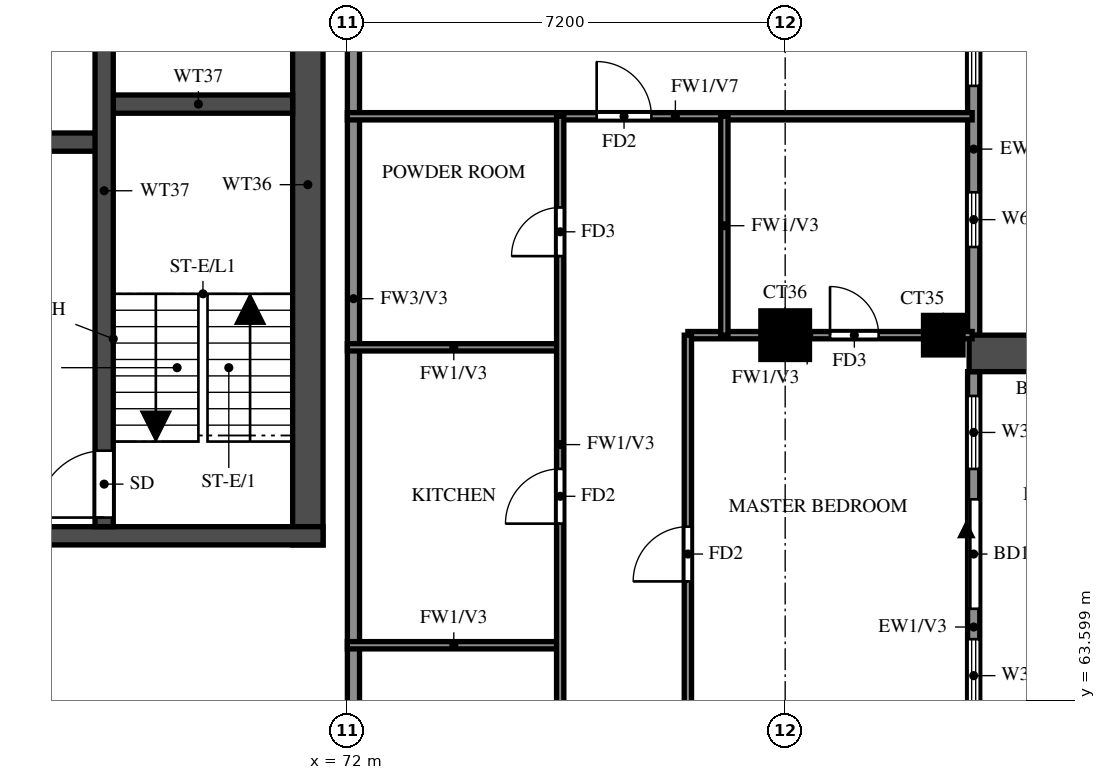
"""IFC4 building model, lengths in metres.
Left out: names, types, materials, properties, quantities, classifications, styles, units other than length and angle.
Written with IfcOpenShell. Run it as: python <this file> out.ifc"""

import sys

from ifc_helpers import new_model, si_unit, direction, frame, frame_2d, origin, origin_2d, place, context, subcontext, project, spatial, rectangle, extrude, source, transform, mapped, element, fill, save


model = new_model("IFC4")
c1 = context("Model", 3, precision=1e-05, world=origin(), true_north=direction((0.0, 1.0)))
c2 = subcontext(c1, "Body", "Model", "MODEL_VIEW")
j1 = project(units=[si_unit("LENGTHUNIT", "METRE"), si_unit("PLANEANGLEUNIT", "RADIAN")], contexts=[c1])
p1 = place(None, origin())
s1 = spatial("IfcSite", under=j1, at=p1, CompositionType="ELEMENT")
p2 = place(p1, origin())
s2 = spatial("IfcBuilding", under=s1, at=p2, CompositionType="ELEMENT")
p3 = place(p2, frame((0.0, 0.0, 250.0)))
s3 = spatial("IfcBuildingStorey", under=s2, at=p3, CompositionType="ELEMENT", Elevation=250.0)
m1 = source(origin(), c2, "Body", "SweptSolid", [
    extrude(rectangle(XDim=0.8, YDim=0.8, at=origin_2d()), origin(), (0.0, 0.0, 1.0), 3.22),
])
p4 = place(p3, frame((79.2, 69.6, 0.0), z_axis=(0.0, 0.0, 1.0), x_axis=(1.0, 0.0, 0.0)))
e1 = element("IfcColumn", 1, at=p4, inside=s3, PredefinedType="COLUMN", context=c2, shape_type="MappedRepresentation", body=[
    mapped(m1, transform((0.0, 0.0, 0.0))),
])
m2 = source(origin(), c2, "Body", "SweptSolid", [
    extrude(rectangle(XDim=0.65, YDim=0.65, at=origin_2d()), origin(), (0.0, 0.0, 1.0), 3.22),
])
p5 = place(p3, frame((81.8, 69.6, 0.0), z_axis=(0.0, 0.0, 1.0), x_axis=(1.0, 0.0, 0.0)))
e2 = element("IfcColumn", 2, at=p5, inside=s3, PredefinedType="COLUMN", context=c2, shape_type="MappedRepresentation", body=[
    mapped(m2, transform((0.0, 0.0, 0.0))),
])
p6 = place(p3, frame((71.35, 66.15, 0.0), z_axis=(0.0, 0.0, 1.0), x_axis=(0.0, 1.0, 0.0)))
e3 = element("IfcWall", 3, at=p6, inside=s3, PredefinedType="SHEAR", context=c2, shape_type="SweptSolid", body=[
    extrude(rectangle(XDim=11.85, YDim=0.5, at=frame_2d((5.925, 0.0))), origin(), (0.0, 0.0, 1.0), 3.22),
])
p7 = place(p3, frame((29.2, 66.3, 0.0), z_axis=(0.0, 0.0, 1.0), x_axis=(1.0, 0.0, 0.0)))
e4 = element("IfcWall", 4, at=p7, inside=s3, PredefinedType="SHEAR", context=c2, shape_type="SweptSolid", body=[
    extrude(rectangle(XDim=42.4, YDim=0.3, at=frame_2d((21.2, 0.0))), origin(), (0.0, 0.0, 1.0), 3.22),
])
p8 = place(p7, frame((1.425, 0.0, 0.0)))
e5 = element("IfcOpeningElement", 5, at=p8, cuts=e4, PredefinedType="OPENING", context=c2, shape_type="SweptSolid", body=[
    extrude(rectangle(XDim=1.1, YDim=2.1, at=frame_2d((0.55, 1.05))), frame((0.0, 0.16, 0.0), z_axis=(0.0, -1.0, 0.0), x_axis=(1.0, 0.0, 0.0)), (0.0, 0.0, 1.0), 0.32),
])
p9 = place(p7, frame((4.2, 0.0, 0.0)))
e6 = element("IfcOpeningElement", 6, at=p9, cuts=e4, PredefinedType="OPENING", context=c2, shape_type="SweptSolid", body=[
    extrude(rectangle(XDim=1.8, YDim=2.1, at=frame_2d((0.9, 1.05))), frame((0.0, 0.16, 0.0), z_axis=(0.0, -1.0, 0.0), x_axis=(1.0, 0.0, 0.0)), (0.0, 0.0, 1.0), 0.32),
])
p10 = place(p3, frame((32.8, 72.775, 0.0), z_axis=(0.0, 0.0, 1.0), x_axis=(1.0, 0.0, 0.0)))
e7 = element("IfcWall", 7, at=p10, inside=s3, PredefinedType="SHEAR", context=c2, shape_type="SweptSolid", body=[
    extrude(rectangle(XDim=35.2, YDim=0.3, at=frame_2d((17.6, 0.0))), origin(), (0.0, 0.0, 1.0), 3.22),
])
p11 = place(p10, frame((19.8, 0.0, 0.0)))
e8 = element("IfcOpeningElement", 8, at=p11, cuts=e7, PredefinedType="OPENING", context=c2, shape_type="SweptSolid", body=[
    extrude(rectangle(XDim=1.1, YDim=2.1, at=frame_2d((0.55, 1.05))), frame((0.0, 0.16, 0.0), z_axis=(0.0, -1.0, 0.0), x_axis=(1.0, 0.0, 0.0)), (0.0, 0.0, 1.0), 0.32),
])
p12 = place(p10, frame((27.725, 0.0, 0.0)))
e9 = element("IfcOpeningElement", 9, at=p12, cuts=e7, PredefinedType="OPENING", context=c2, shape_type="SweptSolid", body=[
    extrude(rectangle(XDim=1.1, YDim=2.1, at=frame_2d((0.55, 1.05))), frame((0.0, 0.16, 0.0), z_axis=(0.0, -1.0, 0.0), x_axis=(1.0, 0.0, 0.0)), (0.0, 0.0, 1.0), 0.32),
])
p13 = place(p10, frame((30.325, 0.0, 0.0)))
e10 = element("IfcOpeningElement", 10, at=p13, cuts=e7, PredefinedType="OPENING", context=c2, shape_type="SweptSolid", body=[
    extrude(rectangle(XDim=1.1, YDim=2.1, at=frame_2d((0.55, 1.05))), frame((0.0, 0.16, 0.0), z_axis=(0.0, -1.0, 0.0), x_axis=(1.0, 0.0, 0.0)), (0.0, 0.0, 1.0), 0.32),
])
p14 = place(p10, frame((3.825, 0.0, 0.0)))
e11 = element("IfcOpeningElement", 11, at=p14, cuts=e7, PredefinedType="OPENING", context=c2, shape_type="SweptSolid", body=[
    extrude(rectangle(XDim=1.1, YDim=2.1, at=frame_2d((0.55, 1.05))), frame((0.0, 0.16, 0.0), z_axis=(0.0, -1.0, 0.0), x_axis=(1.0, 0.0, 0.0)), (0.0, 0.0, 1.0), 0.32),
])
p15 = place(p10, frame((6.575, 0.0, 0.0)))
e12 = element("IfcOpeningElement", 12, at=p15, cuts=e7, PredefinedType="OPENING", context=c2, shape_type="SweptSolid", body=[
    extrude(rectangle(XDim=1.1, YDim=2.1, at=frame_2d((0.55, 1.05))), frame((0.0, 0.16, 0.0), z_axis=(0.0, -1.0, 0.0), x_axis=(1.0, 0.0, 0.0)), (0.0, 0.0, 1.0), 0.32),
])
p16 = place(p10, frame((9.325, 0.0, 0.0)))
e13 = element("IfcOpeningElement", 13, at=p16, cuts=e7, PredefinedType="OPENING", context=c2, shape_type="SweptSolid", body=[
    extrude(rectangle(XDim=1.1, YDim=2.1, at=frame_2d((0.55, 1.05))), frame((0.0, 0.16, 0.0), z_axis=(0.0, -1.0, 0.0), x_axis=(1.0, 0.0, 0.0)), (0.0, 0.0, 1.0), 0.32),
])
p17 = place(p10, frame((12.075, 0.0, 0.0)))
e14 = element("IfcOpeningElement", 14, at=p17, cuts=e7, PredefinedType="OPENING", context=c2, shape_type="SweptSolid", body=[
    extrude(rectangle(XDim=1.1, YDim=2.1, at=frame_2d((0.55, 1.05))), frame((0.0, 0.16, 0.0), z_axis=(0.0, -1.0, 0.0), x_axis=(1.0, 0.0, 0.0)), (0.0, 0.0, 1.0), 0.32),
])
p18 = place(p10, frame((14.825, 0.0, 0.0)))
e15 = element("IfcOpeningElement", 15, at=p18, cuts=e7, PredefinedType="OPENING", context=c2, shape_type="SweptSolid", body=[
    extrude(rectangle(XDim=1.1, YDim=2.1, at=frame_2d((0.55, 1.05))), frame((0.0, 0.16, 0.0), z_axis=(0.0, -1.0, 0.0), x_axis=(1.0, 0.0, 0.0)), (0.0, 0.0, 1.0), 0.32),
])
p19 = place(p10, frame((17.575, 0.0, 0.0)))
e16 = element("IfcOpeningElement", 16, at=p19, cuts=e7, PredefinedType="OPENING", context=c2, shape_type="SweptSolid", body=[
    extrude(rectangle(XDim=1.1, YDim=2.1, at=frame_2d((0.55, 1.05))), frame((0.0, 0.16, 0.0), z_axis=(0.0, -1.0, 0.0), x_axis=(1.0, 0.0, 0.0)), (0.0, 0.0, 1.0), 0.32),
])
p20 = place(p10, frame((0.95, 0.0, 0.0)))
e17 = element("IfcOpeningElement", 17, at=p20, cuts=e7, PredefinedType="OPENING", context=c2, shape_type="SweptSolid", body=[
    extrude(rectangle(XDim=1.1, YDim=2.1, at=frame_2d((0.55, 1.05))), frame((0.0, 0.16, 0.0), z_axis=(0.0, -1.0, 0.0), x_axis=(1.0, 0.0, 0.0)), (0.0, 0.0, 1.0), 0.32),
])
p21 = place(p3, frame((68.0, 73.4, 0.0), z_axis=(0.0, 0.0, 1.0), x_axis=(1.0, 0.0, 0.0)))
e18 = element("IfcWall", 18, at=p21, inside=s3, PredefinedType="SHEAR", context=c2, shape_type="SweptSolid", body=[
    extrude(rectangle(XDim=3.1, YDim=0.3, at=frame_2d((1.55, 0.0))), origin(), (0.0, 0.0, 1.0), 3.22),
])
p22 = place(p3, frame((68.0, 66.45, 0.0), z_axis=(0.0, 0.0, 1.0), x_axis=(0.0, 1.0, 0.0)))
e19 = element("IfcWall", 19, at=p22, inside=s3, PredefinedType="SHEAR", context=c2, shape_type="SweptSolid", body=[
    extrude(rectangle(XDim=11.05, YDim=0.3, at=frame_2d((5.525, 0.0))), origin(), (0.0, 0.0, 1.0), 3.22),
])
p23 = place(p22, frame((0.15, 0.0, 0.0)))
e20 = element("IfcOpeningElement", 20, at=p23, cuts=e19, PredefinedType="OPENING", context=c2, shape_type="SweptSolid", body=[
    extrude(rectangle(XDim=1.1, YDim=2.1, at=frame_2d((0.55, 1.05))), frame((0.0, 0.16, 0.0), z_axis=(0.0, -1.0, 0.0), x_axis=(1.0, 0.0, 0.0)), (0.0, 0.0, 1.0), 0.32),
])
p24 = place(p3, frame((82.3, 63.0, 0.0), z_axis=(0.0, 0.0, 1.0), x_axis=(0.0, 1.0, 0.0)))
e21 = element("IfcWall", 21, at=p24, inside=s3, PredefinedType="SOLIDWALL", context=c2, shape_type="SweptSolid", body=[
    extrude(rectangle(XDim=6.0, YDim=0.2, at=frame_2d((3.0, 0.0))), origin(), (0.0, 0.0, 1.0), 3.22),
])
p25 = place(p24, frame((2.1, 0.0, 0.0)))
e22 = element("IfcOpeningElement", 22, at=p25, cuts=e21, PredefinedType="OPENING", context=c2, shape_type="SweptSolid", body=[
    extrude(rectangle(XDim=1.8, YDim=2.4, at=frame_2d((0.9, 1.2))), frame((0.0, 0.11, 0.0), z_axis=(0.0, -1.0, 0.0), x_axis=(1.0, 0.0, 0.0)), (0.0, 0.0, 1.0), 0.22),
])
p26 = place(p24, frame((0.4, 0.0, 0.6)))
e23 = element("IfcOpeningElement", 23, at=p26, cuts=e21, PredefinedType="OPENING", context=c2, shape_type="SweptSolid", body=[
    extrude(rectangle(XDim=1.2, YDim=2.4, at=frame_2d((0.6, 1.2))), frame((0.0, 0.11, 0.0), z_axis=(0.0, -1.0, 0.0), x_axis=(1.0, 0.0, 0.0)), (0.0, 0.0, 1.0), 0.22),
])
p27 = place(p24, frame((4.4, 0.0, 0.6)))
e24 = element("IfcOpeningElement", 24, at=p27, cuts=e21, PredefinedType="OPENING", context=c2, shape_type="SweptSolid", body=[
    extrude(rectangle(XDim=1.2, YDim=2.4, at=frame_2d((0.6, 1.2))), frame((0.0, 0.11, 0.0), z_axis=(0.0, -1.0, 0.0), x_axis=(1.0, 0.0, 0.0)), (0.0, 0.0, 1.0), 0.22),
])
p28 = place(p3, frame((82.3, 69.6, 0.0), z_axis=(0.0, 0.0, 1.0), x_axis=(0.0, 1.0, 0.0)))
e25 = element("IfcWall", 25, at=p28, inside=s3, PredefinedType="SOLIDWALL", context=c2, shape_type="SweptSolid", body=[
    extrude(rectangle(XDim=7.2, YDim=0.2, at=frame_2d((3.6, 0.0))), origin(), (0.0, 0.0, 1.0), 3.22),
])
p29 = place(p28, frame((1.45, 0.0, 1.5)))
e26 = element("IfcOpeningElement", 26, at=p29, cuts=e25, PredefinedType="OPENING", context=c2, shape_type="SweptSolid", body=[
    extrude(rectangle(XDim=0.9, YDim=0.9, at=frame_2d((0.45, 0.45))), frame((0.0, 0.11, 0.0), z_axis=(0.0, -1.0, 0.0), x_axis=(1.0, 0.0, 0.0)), (0.0, 0.0, 1.0), 0.22),
])
p30 = place(p28, frame((4.1, 0.0, 0.6)))
e27 = element("IfcOpeningElement", 27, at=p30, cuts=e25, PredefinedType="OPENING", context=c2, shape_type="SweptSolid", body=[
    extrude(rectangle(XDim=2.4, YDim=2.4, at=frame_2d((1.2, 1.2))), frame((0.0, 0.11, 0.0), z_axis=(0.0, -1.0, 0.0), x_axis=(1.0, 0.0, 0.0)), (0.0, 0.0, 1.0), 0.22),
])
p31 = place(p3, frame((82.225, 69.3, 0.0), z_axis=(0.0, 0.0, 1.0), x_axis=(1.0, 0.0, 0.0)))
e28 = element("IfcWall", 28, at=p31, inside=s3, PredefinedType="SOLIDWALL", context=c2, shape_type="SweptSolid", body=[
    extrude(rectangle(XDim=2.875, YDim=0.6, at=frame_2d((1.438, 0.0))), origin(), (0.0, 0.0, 1.0), 2.85),
])
p32 = place(p3, frame((72.1, 62.4, 0.0), z_axis=(0.0, 0.0, 1.0), x_axis=(0.0, 1.0, 0.0)))
e29 = element("IfcWall", 29, at=p32, inside=s3, PredefinedType="SOLIDWALL", context=c2, shape_type="SweptSolid", body=[
    extrude(rectangle(XDim=15.6, YDim=0.2, at=frame_2d((7.8, 0.0))), origin(), (0.0, 0.0, 1.0), 3.22),
])
for number, where, z_axis, x_axis in (
    (30, (72.0, 64.5, 0.0), (0.0, 0.0, 1.0), (1.0, 0.0, 0.0)),
    (31, (72.0, 69.4, 0.0), (0.0, 0.0, 1.0), (1.0, 0.0, 0.0)),
):
    element("IfcWall", number, at=place(p3, frame(where, z_axis=z_axis, x_axis=x_axis)), inside=s3, PredefinedType="PARTITIONING", context=c2, shape_type="SweptSolid", body=[
        extrude(rectangle(XDim=3.5, YDim=0.12, at=frame_2d((1.75, 0.0))), origin(), (0.0, 0.0, 1.0), 3.22),
    ])
p33 = place(p3, frame((77.6, 69.6, 0.0), z_axis=(0.0, 0.0, 1.0), x_axis=(1.0, 0.0, 0.0)))
e32 = element("IfcWall", 32, at=p33, inside=s3, PredefinedType="PARTITIONING", context=c2, shape_type="SweptSolid", body=[
    extrude(rectangle(XDim=4.675, YDim=0.12, at=frame_2d((2.337, 0.0))), origin(), (0.0, 0.0, 1.0), 3.22),
])
p34 = place(p33, frame((2.337, 0.0, 0.0)))
e33 = element("IfcOpeningElement", 33, at=p34, cuts=e32, PredefinedType="OPENING", context=c2, shape_type="SweptSolid", body=[
    extrude(rectangle(XDim=0.8, YDim=2.1, at=frame_2d((0.4, 1.05))), frame((0.0, 0.07, 0.0), z_axis=(0.0, -1.0, 0.0), x_axis=(1.0, 0.0, 0.0)), (0.0, 0.0, 1.0), 0.14),
])
p35 = place(p3, frame((72.0, 73.2, 0.0), z_axis=(0.0, 0.0, 1.0), x_axis=(1.0, 0.0, 0.0)))
e34 = element("IfcWall", 34, at=p35, inside=s3, PredefinedType="PARTITIONING", context=c2, shape_type="SweptSolid", body=[
    extrude(rectangle(XDim=10.275, YDim=0.12, at=frame_2d((5.137, 0.0))), origin(), (0.0, 0.0, 1.0), 2.32),
])
p36 = place(p35, frame((4.1, 0.0, 0.0)))
e35 = element("IfcOpeningElement", 35, at=p36, cuts=e34, PredefinedType="OPENING", context=c2, shape_type="SweptSolid", body=[
    extrude(rectangle(XDim=0.9, YDim=2.1, at=frame_2d((0.45, 1.05))), frame((0.0, 0.07, 0.0), z_axis=(0.0, -1.0, 0.0), x_axis=(1.0, 0.0, 0.0)), (0.0, 0.0, 1.0), 0.14),
])
p37 = place(p3, frame((75.5, 61.2, 0.0), z_axis=(0.0, 0.0, 1.0), x_axis=(0.0, 1.0, 0.0)))
e36 = element("IfcWall", 36, at=p37, inside=s3, PredefinedType="PARTITIONING", context=c2, shape_type="SweptSolid", body=[
    extrude(rectangle(XDim=12.0, YDim=0.12, at=frame_2d((6.0, 0.0))), origin(), (0.0, 0.0, 1.0), 3.22),
])
p38 = place(p37, frame((5.3, 0.0, 0.0)))
e37 = element("IfcOpeningElement", 37, at=p38, cuts=e36, PredefinedType="OPENING", context=c2, shape_type="SweptSolid", body=[
    extrude(rectangle(XDim=0.9, YDim=2.1, at=frame_2d((0.45, 1.05))), frame((0.0, 0.07, 0.0), z_axis=(0.0, -1.0, 0.0), x_axis=(1.0, 0.0, 0.0)), (0.0, 0.0, 1.0), 0.14),
])
p39 = place(p37, frame((9.7, 0.0, 0.0)))
e38 = element("IfcOpeningElement", 38, at=p39, cuts=e36, PredefinedType="OPENING", context=c2, shape_type="SweptSolid", body=[
    extrude(rectangle(XDim=0.8, YDim=2.1, at=frame_2d((0.4, 1.05))), frame((0.0, 0.07, 0.0), z_axis=(0.0, -1.0, 0.0), x_axis=(1.0, 0.0, 0.0)), (0.0, 0.0, 1.0), 0.14),
])
p40 = place(p3, frame((77.6, 48.125, 0.0), z_axis=(0.0, 0.0, 1.0), x_axis=(0.0, 1.0, 0.0)))
e39 = element("IfcWall", 39, at=p40, inside=s3, PredefinedType="PARTITIONING", context=c2, shape_type="SweptSolid", body=[
    extrude(rectangle(XDim=21.475, YDim=0.12, at=frame_2d((10.738, 0.0))), origin(), (0.0, 0.0, 1.0), 3.22),
])
p41 = place(p40, frame((2.788, 0.0, 0.0)))
e40 = element("IfcOpeningElement", 40, at=p41, cuts=e39, PredefinedType="OPENING", context=c2, shape_type="SweptSolid", body=[
    extrude(rectangle(XDim=1.5, YDim=2.1, at=frame_2d((0.75, 1.05))), frame((0.0, 0.07, 0.0), z_axis=(0.0, -1.0, 0.0), x_axis=(1.0, 0.0, 0.0)), (0.0, 0.0, 1.0), 0.14),
])
p42 = place(p40, frame((8.425, 0.0, 0.0)))
e41 = element("IfcOpeningElement", 41, at=p42, cuts=e39, PredefinedType="OPENING", context=c2, shape_type="SweptSolid", body=[
    extrude(rectangle(XDim=0.9, YDim=2.1, at=frame_2d((0.45, 1.05))), frame((0.0, 0.07, 0.0), z_axis=(0.0, -1.0, 0.0), x_axis=(1.0, 0.0, 0.0)), (0.0, 0.0, 1.0), 0.14),
])
p43 = place(p40, frame((12.025, 0.0, 0.0)))
e42 = element("IfcOpeningElement", 42, at=p43, cuts=e39, PredefinedType="OPENING", context=c2, shape_type="SweptSolid", body=[
    extrude(rectangle(XDim=0.9, YDim=2.1, at=frame_2d((0.45, 1.05))), frame((0.0, 0.07, 0.0), z_axis=(0.0, -1.0, 0.0), x_axis=(1.0, 0.0, 0.0)), (0.0, 0.0, 1.0), 0.14),
])
p44 = place(p40, frame((17.425, 0.0, 0.0)))
e43 = element("IfcOpeningElement", 43, at=p44, cuts=e39, PredefinedType="OPENING", context=c2, shape_type="SweptSolid", body=[
    extrude(rectangle(XDim=0.9, YDim=2.1, at=frame_2d((0.45, 1.05))), frame((0.0, 0.07, 0.0), z_axis=(0.0, -1.0, 0.0), x_axis=(1.0, 0.0, 0.0)), (0.0, 0.0, 1.0), 0.14),
])
p45 = place(p3, frame((78.2, 69.6, 0.0), z_axis=(0.0, 0.0, 1.0), x_axis=(0.0, 1.0, 0.0)))
e44 = element("IfcWall", 44, at=p45, inside=s3, PredefinedType="PARTITIONING", context=c2, shape_type="SweptSolid", body=[
    extrude(rectangle(XDim=3.6, YDim=0.12, at=frame_2d((1.8, 0.0))), origin(), (0.0, 0.0, 1.0), 3.22),
])
p46 = place(p25, origin())
e45 = element("IfcDoor", 45, at=p46, inside=s3, OperationType="DOUBLE_DOOR_SLIDING", PredefinedType="DOOR", context=c2, shape_type="SweptSolid", body=[
    extrude(rectangle(XDim=1.8, YDim=2.4, at=frame_2d((0.9, 1.2))), frame((0.0, 0.025, 0.0), z_axis=(0.0, -1.0, 0.0), x_axis=(1.0, 0.0, 0.0)), (0.0, 0.0, 1.0), 0.05),
])
fill(e22, e45)
p47 = place(p26, origin())
e46 = element("IfcWindow", 46, at=p47, inside=s3, PartitioningType="SINGLE_PANEL", PredefinedType="WINDOW", context=c2, shape_type="SweptSolid", body=[
    extrude(rectangle(XDim=1.2, YDim=2.4, at=frame_2d((0.6, 1.2))), frame((0.0, 0.03, 0.0), z_axis=(0.0, -1.0, 0.0), x_axis=(1.0, 0.0, 0.0)), (0.0, 0.0, 1.0), 0.06),
])
fill(e23, e46)
p48 = place(p27, origin())
e47 = element("IfcWindow", 47, at=p48, inside=s3, PartitioningType="SINGLE_PANEL", PredefinedType="WINDOW", context=c2, shape_type="SweptSolid", body=[
    extrude(rectangle(XDim=1.2, YDim=2.4, at=frame_2d((0.6, 1.2))), frame((0.0, 0.03, 0.0), z_axis=(0.0, -1.0, 0.0), x_axis=(1.0, 0.0, 0.0)), (0.0, 0.0, 1.0), 0.06),
])
fill(e24, e47)
p49 = place(p29, origin())
e48 = element("IfcWindow", 48, at=p49, inside=s3, PartitioningType="SINGLE_PANEL", PredefinedType="WINDOW", context=c2, shape_type="SweptSolid", body=[
    extrude(rectangle(XDim=0.9, YDim=0.9, at=frame_2d((0.45, 0.45))), frame((0.0, 0.03, 0.0), z_axis=(0.0, -1.0, 0.0), x_axis=(1.0, 0.0, 0.0)), (0.0, 0.0, 1.0), 0.06),
])
fill(e26, e48)
p50 = place(p30, origin())
e49 = element("IfcWindow", 49, at=p50, inside=s3, PartitioningType="DOUBLE_PANEL_VERTICAL", PredefinedType="WINDOW", context=c2, shape_type="SweptSolid", body=[
    extrude(rectangle(XDim=2.4, YDim=2.4, at=frame_2d((1.2, 1.2))), frame((0.0, 0.03, 0.0), z_axis=(0.0, -1.0, 0.0), x_axis=(1.0, 0.0, 0.0)), (0.0, 0.0, 1.0), 0.06),
])
fill(e27, e49)
p51 = place(p23, origin())
e50 = element("IfcDoor", 50, at=p51, inside=s3, OperationType="SINGLE_SWING_RIGHT", PredefinedType="DOOR", context=c2, shape_type="SweptSolid", body=[
    extrude(rectangle(XDim=1.1, YDim=2.1, at=frame_2d((0.55, 1.05))), frame((0.0, 0.025, 0.0), z_axis=(0.0, -1.0, 0.0), x_axis=(1.0, 0.0, 0.0)), (0.0, 0.0, 1.0), 0.05),
])
fill(e20, e50)
p52 = place(p44, origin())
e51 = element("IfcDoor", 51, at=p52, inside=s3, OperationType="SINGLE_SWING_LEFT", PredefinedType="DOOR", context=c2, shape_type="SweptSolid", body=[
    extrude(rectangle(XDim=0.9, YDim=2.1, at=frame_2d((0.45, 1.05))), frame((0.0, 0.025, 0.0), z_axis=(0.0, -1.0, 0.0), x_axis=(1.0, 0.0, 0.0)), (0.0, 0.0, 1.0), 0.05),
])
fill(e43, e51)
p53 = place(p34, origin())
e52 = element("IfcDoor", 52, at=p53, inside=s3, OperationType="SINGLE_SWING_RIGHT", PredefinedType="DOOR", context=c2, shape_type="SweptSolid", body=[
    extrude(rectangle(XDim=0.8, YDim=2.1, at=frame_2d((0.4, 1.05))), frame((0.0, 0.025, 0.0), z_axis=(0.0, -1.0, 0.0), x_axis=(1.0, 0.0, 0.0)), (0.0, 0.0, 1.0), 0.05),
])
fill(e33, e52)
p54 = place(p36, origin())
e53 = element("IfcDoor", 53, at=p54, inside=s3, OperationType="SINGLE_SWING_RIGHT", PredefinedType="DOOR", context=c2, shape_type="SweptSolid", body=[
    extrude(rectangle(XDim=0.9, YDim=2.1, at=frame_2d((0.45, 1.05))), frame((0.0, 0.025, 0.0), z_axis=(0.0, -1.0, 0.0), x_axis=(1.0, 0.0, 0.0)), (0.0, 0.0, 1.0), 0.05),
])
fill(e35, e53)
p55 = place(p38, origin())
e54 = element("IfcDoor", 54, at=p55, inside=s3, OperationType="SINGLE_SWING_LEFT", PredefinedType="DOOR", context=c2, shape_type="SweptSolid", body=[
    extrude(rectangle(XDim=0.9, YDim=2.1, at=frame_2d((0.45, 1.05))), frame((0.0, 0.025, 0.0), z_axis=(0.0, -1.0, 0.0), x_axis=(1.0, 0.0, 0.0)), (0.0, 0.0, 1.0), 0.05),
])
fill(e37, e54)
p56 = place(p39, origin())
e55 = element("IfcDoor", 55, at=p56, inside=s3, OperationType="SINGLE_SWING_RIGHT", PredefinedType="DOOR", context=c2, shape_type="SweptSolid", body=[
    extrude(rectangle(XDim=0.8, YDim=2.1, at=frame_2d((0.4, 1.05))), frame((0.0, 0.025, 0.0), z_axis=(0.0, -1.0, 0.0), x_axis=(1.0, 0.0, 0.0)), (0.0, 0.0, 1.0), 0.05),
])
fill(e38, e55)
save(model, sys.argv[1])
